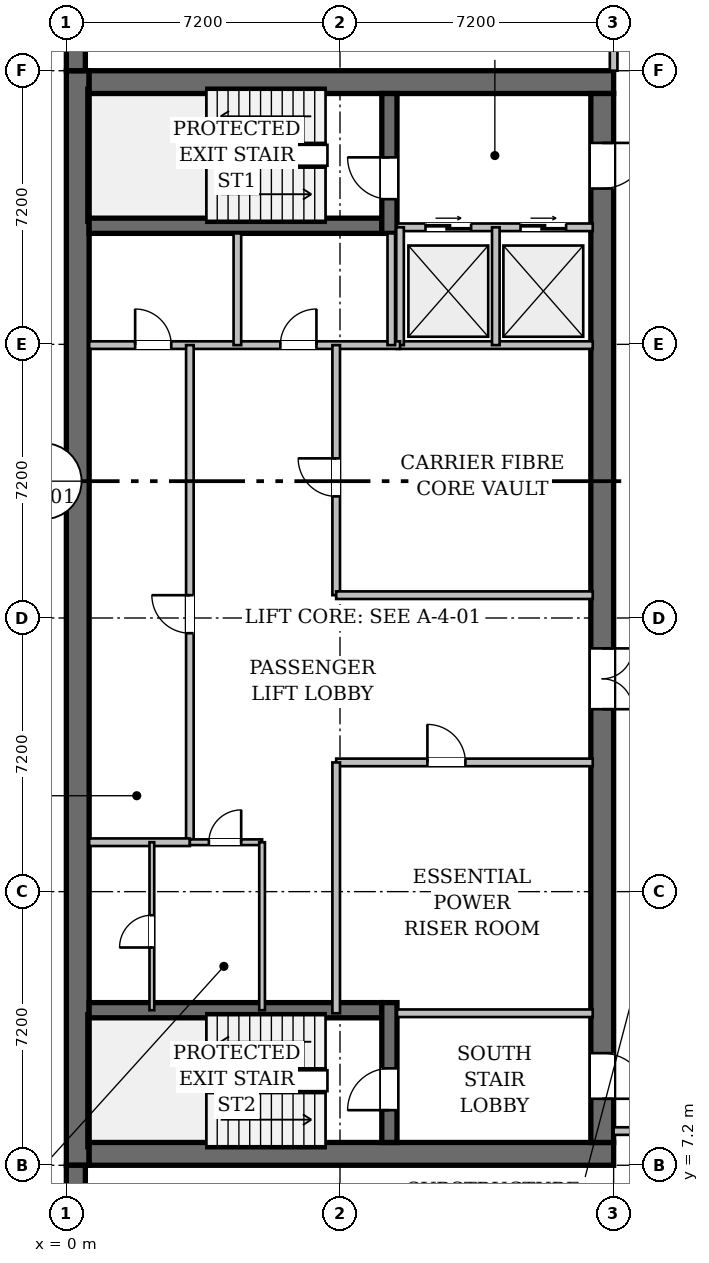
"""IFC4 building model, lengths in metres.
Left out: names, types, materials, properties, quantities, classifications, styles, units other than length and angle.
Written with IfcOpenShell. Run it as: python <this file> out.ifc"""

import sys

from ifc_helpers import new_model, si_unit, direction, frame, frame_2d, origin, place, context, subcontext, project, spatial, rectangle, extrude, element, fill, save


model = new_model("IFC4")
c1 = context("Model", 3, precision=1e-05, world=origin(), true_north=direction((0.0, 1.0)))
c2 = subcontext(c1, "Body", "Model", "MODEL_VIEW")
j1 = project(units=[si_unit("LENGTHUNIT", "METRE"), si_unit("PLANEANGLEUNIT", "RADIAN")], contexts=[c1])
p1 = place(None, origin())
s1 = spatial("IfcSite", under=j1, at=p1, CompositionType="ELEMENT")
p2 = place(p1, origin())
s2 = spatial("IfcBuilding", under=s1, at=p2, CompositionType="ELEMENT")
p3 = place(p2, frame((0.0, 0.0, -9.1)))
s3 = spatial("IfcBuildingStorey", under=s2, at=p3, CompositionType="ELEMENT", Elevation=-9.1)
p4 = place(p3, frame((0.3, 7.2, 0.0), z_axis=(0.0, 0.0, 1.0), x_axis=(0.0, 1.0, 0.0)))
e1 = element("IfcWall", 1, at=p4, inside=s3, PredefinedType="SHEAR", context=c2, shape_type="SweptSolid", body=[
    extrude(rectangle(XDim=28.8, YDim=0.6, at=frame_2d((14.4, 0.0))), origin(), (0.0, 0.0, 1.0), 4.25),
])
for number, where, z_axis, x_axis in (
    (2, (0.6, 7.5, 0.0), (0.0, 0.0, 1.0), (1.0, 0.0, 0.0)),
    (3, (0.6, 35.7, 0.0), (0.0, 0.0, 1.0), (1.0, 0.0, 0.0)),
):
    element("IfcWall", number, at=place(p3, frame(where, z_axis=z_axis, x_axis=x_axis)), inside=s3, PredefinedType="SHEAR", context=c2, shape_type="SweptSolid", body=[
        extrude(rectangle(XDim=13.8, YDim=0.6, at=frame_2d((6.9, 0.0))), origin(), (0.0, 0.0, 1.0), 4.25),
    ])
p5 = place(p3, frame((14.1, 35.4, 0.0), z_axis=(0.0, 0.0, 1.0), x_axis=(0.0, -1.0, 0.0)))
e4 = element("IfcWall", 4, at=p5, inside=s3, PredefinedType="SHEAR", context=c2, shape_type="SweptSolid", body=[
    extrude(rectangle(XDim=27.6, YDim=0.6, at=frame_2d((13.8, 0.0))), origin(), (0.0, 0.0, 1.0), 4.25),
])
p6 = place(p5, frame((1.3, 0.0, 0.0)))
e5 = element("IfcOpeningElement", 5, at=p6, cuts=e4, PredefinedType="OPENING", context=c2, shape_type="SweptSolid", body=[
    extrude(rectangle(XDim=1.2, YDim=2.15, at=frame_2d((0.6, 1.075))), frame((0.0, 0.312, 0.0), z_axis=(0.0, -1.0, 0.0), x_axis=(1.0, 0.0, 0.0)), (0.0, 0.0, 1.0), 0.624),
])
p7 = place(p5, frame((25.25, 0.0, 0.0)))
e6 = element("IfcOpeningElement", 6, at=p7, cuts=e4, PredefinedType="OPENING", context=c2, shape_type="SweptSolid", body=[
    extrude(rectangle(XDim=1.2, YDim=2.15, at=frame_2d((0.6, 1.075))), frame((0.0, 0.312, 0.0), z_axis=(0.0, -1.0, 0.0), x_axis=(1.0, 0.0, 0.0)), (0.0, 0.0, 1.0), 0.624),
])
p8 = place(p5, frame((14.6, 0.0, 0.0)))
e7 = element("IfcOpeningElement", 7, at=p8, cuts=e4, PredefinedType="OPENING", context=c2, shape_type="SweptSolid", body=[
    extrude(rectangle(XDim=1.6, YDim=2.2, at=frame_2d((0.8, 1.1))), frame((0.0, 0.312, 0.0), z_axis=(0.0, -1.0, 0.0), x_axis=(1.0, 0.0, 0.0)), (0.0, 0.0, 1.0), 0.624),
])
for number, where, z_axis, x_axis in (
    (8, (0.6, 31.92, 0.0), (0.0, 0.0, 1.0), (1.0, 0.0, 0.0)),
    (9, (0.6, 11.28, 0.0), (0.0, 0.0, 1.0), (1.0, 0.0, 0.0)),
):
    element("IfcWall", number, at=place(p3, frame(where, z_axis=z_axis, x_axis=x_axis)), inside=s3, PredefinedType="SHEAR", context=c2, shape_type="SweptSolid", body=[
        extrude(rectangle(XDim=7.7, YDim=0.4, at=frame_2d((3.85, 0.0))), origin(), (0.0, 0.0, 1.0), 4.25),
    ])
p9 = place(p3, frame((8.5, 31.72, 0.0), z_axis=(0.0, 0.0, 1.0), x_axis=(0.0, 1.0, 0.0)))
e10 = element("IfcWall", 10, at=p9, inside=s3, PredefinedType="SHEAR", context=c2, shape_type="SweptSolid", body=[
    extrude(rectangle(XDim=3.68, YDim=0.4, at=frame_2d((1.84, 0.0))), origin(), (0.0, 0.0, 1.0), 4.25),
])
p10 = place(p9, frame((0.9, 0.0, 0.0)))
e11 = element("IfcOpeningElement", 11, at=p10, cuts=e10, PredefinedType="OPENING", context=c2, shape_type="SweptSolid", body=[
    extrude(rectangle(XDim=1.1, YDim=2.15, at=frame_2d((0.55, 1.075))), frame((0.0, 0.212, 0.0), z_axis=(0.0, -1.0, 0.0), x_axis=(1.0, 0.0, 0.0)), (0.0, 0.0, 1.0), 0.424),
])
p11 = place(p3, frame((8.5, 7.8, 0.0), z_axis=(0.0, 0.0, 1.0), x_axis=(0.0, 1.0, 0.0)))
e12 = element("IfcWall", 12, at=p11, inside=s3, PredefinedType="SHEAR", context=c2, shape_type="SweptSolid", body=[
    extrude(rectangle(XDim=3.68, YDim=0.4, at=frame_2d((1.84, 0.0))), origin(), (0.0, 0.0, 1.0), 4.25),
])
p12 = place(p11, frame((0.85, 0.0, 0.0)))
e13 = element("IfcOpeningElement", 13, at=p12, cuts=e12, PredefinedType="OPENING", context=c2, shape_type="SweptSolid", body=[
    extrude(rectangle(XDim=1.1, YDim=2.15, at=frame_2d((0.55, 1.075))), frame((0.0, 0.212, 0.0), z_axis=(0.0, -1.0, 0.0), x_axis=(1.0, 0.0, 0.0)), (0.0, 0.0, 1.0), 0.424),
])
p13 = place(p3, frame((0.25, 3.2, 0.0), z_axis=(0.0, 0.0, 1.0), x_axis=(0.0, 1.0, 0.0)))
e14 = element("IfcWall", 14, at=p13, inside=s3, PredefinedType="SOLIDWALL", context=c2, shape_type="SweptSolid", body=[
    extrude(rectangle(XDim=4.0, YDim=0.5, at=frame_2d((2.0, 0.0))), origin(), (0.0, 0.0, 1.0), 4.25),
])
p14 = place(p3, frame((0.25, 36.0, 0.0), z_axis=(0.0, 0.0, 1.0), x_axis=(0.0, 1.0, 0.0)))
e15 = element("IfcWall", 15, at=p14, inside=s3, PredefinedType="SOLIDWALL", context=c2, shape_type="SweptSolid", body=[
    extrude(rectangle(XDim=11.2, YDim=0.5, at=frame_2d((5.6, 0.0))), origin(), (0.0, 0.0, 1.0), 4.25),
])
p15 = place(p3, frame((8.7, 31.88, 0.0), z_axis=(0.0, 0.0, 1.0), x_axis=(1.0, 0.0, 0.0)))
e16 = element("IfcWall", 16, at=p15, inside=s3, PredefinedType="PARTITIONING", context=c2, shape_type="SweptSolid", body=[
    extrude(rectangle(XDim=5.15, YDim=0.2, at=frame_2d((2.575, 0.0))), origin(), (0.0, 0.0, 1.0), 4.25),
])
p16 = place(p15, frame((0.75, 0.0, 0.0)))
e17 = element("IfcOpeningElement", 17, at=p16, cuts=e16, PredefinedType="OPENING", context=c2, shape_type="SweptSolid", body=[
    extrude(rectangle(XDim=1.2, YDim=2.2, at=frame_2d((0.6, 1.1))), frame((0.0, 0.112, 0.0), z_axis=(0.0, -1.0, 0.0), x_axis=(1.0, 0.0, 0.0)), (0.0, 0.0, 1.0), 0.224),
])
p17 = place(p15, frame((3.25, 0.0, 0.0)))
e18 = element("IfcOpeningElement", 18, at=p17, cuts=e16, PredefinedType="OPENING", context=c2, shape_type="SweptSolid", body=[
    extrude(rectangle(XDim=1.2, YDim=2.2, at=frame_2d((0.6, 1.1))), frame((0.0, 0.112, 0.0), z_axis=(0.0, -1.0, 0.0), x_axis=(1.0, 0.0, 0.0)), (0.0, 0.0, 1.0), 0.224),
])
for number, where, z_axis, x_axis in (
    (19, (8.7, 11.2, 0.0), (0.0, 0.0, 1.0), (1.0, 0.0, 0.0)),
    (20, (8.7, 28.78, 0.0), (0.0, 0.0, 1.0), (1.0, 0.0, 0.0)),
):
    element("IfcWall", number, at=place(p3, frame(where, z_axis=z_axis, x_axis=x_axis)), inside=s3, PredefinedType="PARTITIONING", context=c2, shape_type="SweptSolid", body=[
        extrude(rectangle(XDim=5.15, YDim=0.2, at=frame_2d((2.575, 0.0))), origin(), (0.0, 0.0, 1.0), 4.25),
    ])
for number, where, z_axis, x_axis in (
    (21, (8.78, 28.78, 0.0), (0.0, 0.0, 1.0), (0.0, 1.0, 0.0)),
    (22, (11.3, 28.78, 0.0), (0.0, 0.0, 1.0), (0.0, 1.0, 0.0)),
):
    element("IfcWall", number, at=place(p3, frame(where, z_axis=z_axis, x_axis=x_axis)), inside=s3, PredefinedType="PARTITIONING", context=c2, shape_type="SweptSolid", body=[
        extrude(rectangle(XDim=3.1, YDim=0.2, at=frame_2d((1.55, 0.0))), origin(), (0.0, 0.0, 1.0), 4.25),
    ])
p18 = place(p3, frame((0.6, 28.78, 0.0), z_axis=(0.0, 0.0, 1.0), x_axis=(1.0, 0.0, 0.0)))
e23 = element("IfcWall", 23, at=p18, inside=s3, PredefinedType="PARTITIONING", context=c2, shape_type="SweptSolid", body=[
    extrude(rectangle(XDim=8.18, YDim=0.2, at=frame_2d((4.09, 0.0))), origin(), (0.0, 0.0, 1.0), 4.25),
])
p19 = place(p18, frame((1.21, 0.0, 0.0)))
e24 = element("IfcOpeningElement", 24, at=p19, cuts=e23, PredefinedType="OPENING", context=c2, shape_type="SweptSolid", body=[
    extrude(rectangle(XDim=0.95, YDim=2.15, at=frame_2d((0.475, 1.075))), frame((0.0, 0.112, 0.0), z_axis=(0.0, -1.0, 0.0), x_axis=(1.0, 0.0, 0.0)), (0.0, 0.0, 1.0), 0.224),
])
p20 = place(p18, frame((5.03, 0.0, 0.0)))
e25 = element("IfcOpeningElement", 25, at=p20, cuts=e23, PredefinedType="OPENING", context=c2, shape_type="SweptSolid", body=[
    extrude(rectangle(XDim=0.95, YDim=2.15, at=frame_2d((0.475, 1.075))), frame((0.0, 0.112, 0.0), z_axis=(0.0, -1.0, 0.0), x_axis=(1.0, 0.0, 0.0)), (0.0, 0.0, 1.0), 0.224),
])
for number, where, z_axis, x_axis in (
    (26, (4.5, 28.78, 0.0), (0.0, 0.0, 1.0), (0.0, 1.0, 0.0)),
    (27, (8.55, 28.78, 0.0), (0.0, 0.0, 1.0), (0.0, 1.0, 0.0)),
):
    element("IfcWall", number, at=place(p3, frame(where, z_axis=z_axis, x_axis=x_axis)), inside=s3, PredefinedType="PARTITIONING", context=c2, shape_type="SweptSolid", body=[
        extrude(rectangle(XDim=2.94, YDim=0.2, at=frame_2d((1.47, 0.0))), origin(), (0.0, 0.0, 1.0), 4.25),
    ])
p21 = place(p3, frame((3.25, 15.7, 0.0), z_axis=(0.0, 0.0, 1.0), x_axis=(0.0, 1.0, 0.0)))
e28 = element("IfcWall", 28, at=p21, inside=s3, PredefinedType="PARTITIONING", context=c2, shape_type="SweptSolid", body=[
    extrude(rectangle(XDim=13.08, YDim=0.2, at=frame_2d((6.54, 0.0))), origin(), (0.0, 0.0, 1.0), 4.25),
])
p22 = place(p21, frame((5.5, 0.0, 0.0)))
e29 = element("IfcOpeningElement", 29, at=p22, cuts=e28, PredefinedType="OPENING", context=c2, shape_type="SweptSolid", body=[
    extrude(rectangle(XDim=1.0, YDim=2.15, at=frame_2d((0.5, 1.075))), frame((0.0, 0.112, 0.0), z_axis=(0.0, -1.0, 0.0), x_axis=(1.0, 0.0, 0.0)), (0.0, 0.0, 1.0), 0.224),
])
p23 = place(p3, frame((0.6, 15.7, 0.0), z_axis=(0.0, 0.0, 1.0), x_axis=(1.0, 0.0, 0.0)))
e30 = element("IfcWall", 30, at=p23, inside=s3, PredefinedType="PARTITIONING", context=c2, shape_type="SweptSolid", body=[
    extrude(rectangle(XDim=2.65, YDim=0.2, at=frame_2d((1.325, 0.0))), origin(), (0.0, 0.0, 1.0), 4.25),
])
p24 = place(p3, frame((7.1, 22.2, 0.0), z_axis=(0.0, 0.0, 1.0), x_axis=(0.0, 1.0, 0.0)))
e31 = element("IfcWall", 31, at=p24, inside=s3, PredefinedType="PARTITIONING", context=c2, shape_type="SweptSolid", body=[
    extrude(rectangle(XDim=6.58, YDim=0.2, at=frame_2d((3.29, 0.0))), origin(), (0.0, 0.0, 1.0), 4.25),
])
p25 = place(p24, frame((2.6, 0.0, 0.0)))
e32 = element("IfcOpeningElement", 32, at=p25, cuts=e31, PredefinedType="OPENING", context=c2, shape_type="SweptSolid", body=[
    extrude(rectangle(XDim=1.0, YDim=2.15, at=frame_2d((0.5, 1.075))), frame((0.0, 0.112, 0.0), z_axis=(0.0, -1.0, 0.0), x_axis=(1.0, 0.0, 0.0)), (0.0, 0.0, 1.0), 0.224),
])
p26 = place(p3, frame((7.1, 22.2, 0.0), z_axis=(0.0, 0.0, 1.0), x_axis=(1.0, 0.0, 0.0)))
e33 = element("IfcWall", 33, at=p26, inside=s3, PredefinedType="PARTITIONING", context=c2, shape_type="SweptSolid", body=[
    extrude(rectangle(XDim=6.75, YDim=0.2, at=frame_2d((3.375, 0.0))), origin(), (0.0, 0.0, 1.0), 4.25),
])
p27 = place(p3, frame((7.1, 17.8, 0.0), z_axis=(0.0, 0.0, 1.0), x_axis=(1.0, 0.0, 0.0)))
e34 = element("IfcWall", 34, at=p27, inside=s3, PredefinedType="PARTITIONING", context=c2, shape_type="SweptSolid", body=[
    extrude(rectangle(XDim=6.75, YDim=0.2, at=frame_2d((3.375, 0.0))), origin(), (0.0, 0.0, 1.0), 4.25),
])
p28 = place(p27, frame((2.4, 0.0, 0.0)))
e35 = element("IfcOpeningElement", 35, at=p28, cuts=e34, PredefinedType="OPENING", context=c2, shape_type="SweptSolid", body=[
    extrude(rectangle(XDim=1.0, YDim=2.15, at=frame_2d((0.5, 1.075))), frame((0.0, 0.112, 0.0), z_axis=(0.0, -1.0, 0.0), x_axis=(1.0, 0.0, 0.0)), (0.0, 0.0, 1.0), 0.224),
])
p29 = place(p3, frame((7.1, 11.2, 0.0), z_axis=(0.0, 0.0, 1.0), x_axis=(0.0, 1.0, 0.0)))
e36 = element("IfcWall", 36, at=p29, inside=s3, PredefinedType="PARTITIONING", context=c2, shape_type="SweptSolid", body=[
    extrude(rectangle(XDim=6.6, YDim=0.2, at=frame_2d((3.3, 0.0))), origin(), (0.0, 0.0, 1.0), 4.25),
])
p30 = place(p3, frame((3.25, 15.7, 0.0), z_axis=(0.0, 0.0, 1.0), x_axis=(1.0, 0.0, 0.0)))
e37 = element("IfcWall", 37, at=p30, inside=s3, PredefinedType="PARTITIONING", context=c2, shape_type="SweptSolid", body=[
    extrude(rectangle(XDim=1.9, YDim=0.15, at=frame_2d((0.95, 0.0))), origin(), (0.0, 0.0, 1.0), 4.25),
])
p31 = place(p30, frame((0.5, 0.0, 0.0)))
e38 = element("IfcOpeningElement", 38, at=p31, cuts=e37, PredefinedType="OPENING", context=c2, shape_type="SweptSolid", body=[
    extrude(rectangle(XDim=0.85, YDim=2.15, at=frame_2d((0.425, 1.075))), frame((0.0, 0.087, 0.0), z_axis=(0.0, -1.0, 0.0), x_axis=(1.0, 0.0, 0.0)), (0.0, 0.0, 1.0), 0.174),
])
p32 = place(p3, frame((5.15, 11.28, 0.0), z_axis=(0.0, 0.0, 1.0), x_axis=(0.0, 1.0, 0.0)))
e39 = element("IfcWall", 39, at=p32, inside=s3, PredefinedType="PARTITIONING", context=c2, shape_type="SweptSolid", body=[
    extrude(rectangle(XDim=4.42, YDim=0.15, at=frame_2d((2.21, 0.0))), origin(), (0.0, 0.0, 1.0), 4.25),
])
p33 = place(p3, frame((2.25, 11.28, 0.0), z_axis=(0.0, 0.0, 1.0), x_axis=(0.0, 1.0, 0.0)))
e40 = element("IfcWall", 40, at=p33, inside=s3, PredefinedType="PARTITIONING", context=c2, shape_type="SweptSolid", body=[
    extrude(rectangle(XDim=4.42, YDim=0.125, at=frame_2d((2.21, 0.0))), origin(), (0.0, 0.0, 1.0), 4.25),
])
p34 = place(p33, frame((1.65, 0.0, 0.0)))
e41 = element("IfcOpeningElement", 41, at=p34, cuts=e40, PredefinedType="OPENING", context=c2, shape_type="SweptSolid", body=[
    extrude(rectangle(XDim=0.85, YDim=2.15, at=frame_2d((0.425, 1.075))), frame((0.0, 0.074, 0.0), z_axis=(0.0, -1.0, 0.0), x_axis=(1.0, 0.0, 0.0)), (0.0, 0.0, 1.0), 0.149),
])
p35 = place(p3, frame((14.4, 8.1, 0.0), z_axis=(0.0, 0.0, 1.0), x_axis=(1.0, 0.0, 0.0)))
e42 = element("IfcWall", 42, at=p35, inside=s3, PredefinedType="PARTITIONING", context=c2, shape_type="SweptSolid", body=[
    extrude(rectangle(XDim=53.7, YDim=0.2, at=frame_2d((26.85, 0.0))), origin(), (0.0, 0.0, 1.0), 3.288),
])
p36 = place(p35, frame((1.1, 0.0, 0.0)))
e43 = element("IfcOpeningElement", 43, at=p36, cuts=e42, PredefinedType="OPENING", context=c2, shape_type="SweptSolid", body=[
    extrude(rectangle(XDim=1.1, YDim=2.15, at=frame_2d((0.55, 1.075))), frame((0.0, 0.112, 0.0), z_axis=(0.0, -1.0, 0.0), x_axis=(1.0, 0.0, 0.0)), (0.0, 0.0, 1.0), 0.224),
])
p37 = place(p3, frame((14.4, 36.0, 0.0), z_axis=(0.0, 0.0, 1.0), x_axis=(0.0, 1.0, 0.0)))
e44 = element("IfcWall", 44, at=p37, inside=s3, PredefinedType="PARTITIONING", context=c2, shape_type="SweptSolid", body=[
    extrude(rectangle(XDim=7.9, YDim=0.2, at=frame_2d((3.95, 0.0))), origin(), (0.0, 0.0, 1.0), 3.288),
])
p38 = place(p37, frame((2.4, 0.0, 0.0)))
e45 = element("IfcOpeningElement", 45, at=p38, cuts=e44, PredefinedType="OPENING", context=c2, shape_type="SweptSolid", body=[
    extrude(rectangle(XDim=1.1, YDim=2.15, at=frame_2d((0.55, 1.075))), frame((0.0, 0.112, 0.0), z_axis=(0.0, -1.0, 0.0), x_axis=(1.0, 0.0, 0.0)), (0.0, 0.0, 1.0), 0.224),
])
p39 = place(p10, origin())
e46 = element("IfcDoor", 46, at=p39, inside=s3, OperationType="SINGLE_SWING_RIGHT", PredefinedType="DOOR", context=c2, shape_type="SweptSolid", body=[
    extrude(rectangle(XDim=1.1, YDim=2.15, at=frame_2d((0.55, 1.075))), frame((0.0, 0.025, 0.0), z_axis=(0.0, -1.0, 0.0), x_axis=(1.0, 0.0, 0.0)), (0.0, 0.0, 1.0), 0.05),
])
fill(e11, e46)
p40 = place(p6, origin())
e47 = element("IfcDoor", 47, at=p40, inside=s3, OperationType="SINGLE_SWING_LEFT", PredefinedType="DOOR", context=c2, shape_type="SweptSolid", body=[
    extrude(rectangle(XDim=1.2, YDim=2.15, at=frame_2d((0.6, 1.075))), frame((0.0, 0.025, 0.0), z_axis=(0.0, -1.0, 0.0), x_axis=(1.0, 0.0, 0.0)), (0.0, 0.0, 1.0), 0.05),
])
fill(e5, e47)
p41 = place(p12, origin())
e48 = element("IfcDoor", 48, at=p41, inside=s3, OperationType="SINGLE_SWING_LEFT", PredefinedType="DOOR", context=c2, shape_type="SweptSolid", body=[
    extrude(rectangle(XDim=1.1, YDim=2.15, at=frame_2d((0.55, 1.075))), frame((0.0, 0.025, 0.0), z_axis=(0.0, -1.0, 0.0), x_axis=(1.0, 0.0, 0.0)), (0.0, 0.0, 1.0), 0.05),
])
fill(e13, e48)
p42 = place(p7, origin())
e49 = element("IfcDoor", 49, at=p42, inside=s3, OperationType="SINGLE_SWING_RIGHT", PredefinedType="DOOR", context=c2, shape_type="SweptSolid", body=[
    extrude(rectangle(XDim=1.2, YDim=2.15, at=frame_2d((0.6, 1.075))), frame((0.0, 0.025, 0.0), z_axis=(0.0, -1.0, 0.0), x_axis=(1.0, 0.0, 0.0)), (0.0, 0.0, 1.0), 0.05),
])
fill(e6, e49)
p43 = place(p16, origin())
e50 = element("IfcDoor", 50, at=p43, inside=s3, OperationType="DOUBLE_DOOR_SLIDING", PredefinedType="DOOR", context=c2, shape_type="SweptSolid", body=[
    extrude(rectangle(XDim=1.2, YDim=2.2, at=frame_2d((0.6, 1.1))), frame((0.0, 0.025, 0.0), z_axis=(0.0, -1.0, 0.0), x_axis=(1.0, 0.0, 0.0)), (0.0, 0.0, 1.0), 0.05),
])
fill(e17, e50)
p44 = place(p17, origin())
e51 = element("IfcDoor", 51, at=p44, inside=s3, OperationType="DOUBLE_DOOR_SLIDING", PredefinedType="DOOR", context=c2, shape_type="SweptSolid", body=[
    extrude(rectangle(XDim=1.2, YDim=2.2, at=frame_2d((0.6, 1.1))), frame((0.0, 0.025, 0.0), z_axis=(0.0, -1.0, 0.0), x_axis=(1.0, 0.0, 0.0)), (0.0, 0.0, 1.0), 0.05),
])
fill(e18, e51)
p45 = place(p19, origin())
e52 = element("IfcDoor", 52, at=p45, inside=s3, OperationType="SINGLE_SWING_LEFT", PredefinedType="DOOR", context=c2, shape_type="SweptSolid", body=[
    extrude(rectangle(XDim=0.95, YDim=2.15, at=frame_2d((0.475, 1.075))), frame((0.0, 0.025, 0.0), z_axis=(0.0, -1.0, 0.0), x_axis=(1.0, 0.0, 0.0)), (0.0, 0.0, 1.0), 0.05),
])
fill(e24, e52)
p46 = place(p20, origin())
e53 = element("IfcDoor", 53, at=p46, inside=s3, OperationType="SINGLE_SWING_RIGHT", PredefinedType="DOOR", context=c2, shape_type="SweptSolid", body=[
    extrude(rectangle(XDim=0.95, YDim=2.15, at=frame_2d((0.475, 1.075))), frame((0.0, 0.025, 0.0), z_axis=(0.0, -1.0, 0.0), x_axis=(1.0, 0.0, 0.0)), (0.0, 0.0, 1.0), 0.05),
])
fill(e25, e53)
p47 = place(p8, origin())
e54 = element("IfcDoor", 54, at=p47, inside=s3, OperationType="DOUBLE_DOOR_SINGLE_SWING", PredefinedType="DOOR", context=c2, shape_type="SweptSolid", body=[
    extrude(rectangle(XDim=1.6, YDim=2.2, at=frame_2d((0.8, 1.1))), frame((0.0, 0.025, 0.0), z_axis=(0.0, -1.0, 0.0), x_axis=(1.0, 0.0, 0.0)), (0.0, 0.0, 1.0), 0.05),
])
fill(e7, e54)
p48 = place(p22, origin())
e55 = element("IfcDoor", 55, at=p48, inside=s3, OperationType="SINGLE_SWING_RIGHT", PredefinedType="DOOR", context=c2, shape_type="SweptSolid", body=[
    extrude(rectangle(XDim=1.0, YDim=2.15, at=frame_2d((0.5, 1.075))), frame((0.0, 0.025, 0.0), z_axis=(0.0, -1.0, 0.0), x_axis=(1.0, 0.0, 0.0)), (0.0, 0.0, 1.0), 0.05),
])
fill(e29, e55)
p49 = place(p25, origin())
e56 = element("IfcDoor", 56, at=p49, inside=s3, OperationType="SINGLE_SWING_RIGHT", PredefinedType="DOOR", context=c2, shape_type="SweptSolid", body=[
    extrude(rectangle(XDim=1.0, YDim=2.15, at=frame_2d((0.5, 1.075))), frame((0.0, 0.025, 0.0), z_axis=(0.0, -1.0, 0.0), x_axis=(1.0, 0.0, 0.0)), (0.0, 0.0, 1.0), 0.05),
])
fill(e32, e56)
p50 = place(p28, origin())
e57 = element("IfcDoor", 57, at=p50, inside=s3, OperationType="SINGLE_SWING_LEFT", PredefinedType="DOOR", context=c2, shape_type="SweptSolid", body=[
    extrude(rectangle(XDim=1.0, YDim=2.15, at=frame_2d((0.5, 1.075))), frame((0.0, 0.025, 0.0), z_axis=(0.0, -1.0, 0.0), x_axis=(1.0, 0.0, 0.0)), (0.0, 0.0, 1.0), 0.05),
])
fill(e35, e57)
p51 = place(p31, origin())
e58 = element("IfcDoor", 58, at=p51, inside=s3, OperationType="SINGLE_SWING_RIGHT", PredefinedType="DOOR", context=c2, shape_type="SweptSolid", body=[
    extrude(rectangle(XDim=0.85, YDim=2.15, at=frame_2d((0.425, 1.075))), frame((0.0, 0.025, 0.0), z_axis=(0.0, -1.0, 0.0), x_axis=(1.0, 0.0, 0.0)), (0.0, 0.0, 1.0), 0.05),
])
fill(e38, e58)
p52 = place(p34, origin())
e59 = element("IfcDoor", 59, at=p52, inside=s3, OperationType="SINGLE_SWING_LEFT", PredefinedType="DOOR", context=c2, shape_type="SweptSolid", body=[
    extrude(rectangle(XDim=0.85, YDim=2.15, at=frame_2d((0.425, 1.075))), frame((0.0, 0.025, 0.0), z_axis=(0.0, -1.0, 0.0), x_axis=(1.0, 0.0, 0.0)), (0.0, 0.0, 1.0), 0.05),
])
fill(e41, e59)
save(model, sys.argv[1])
